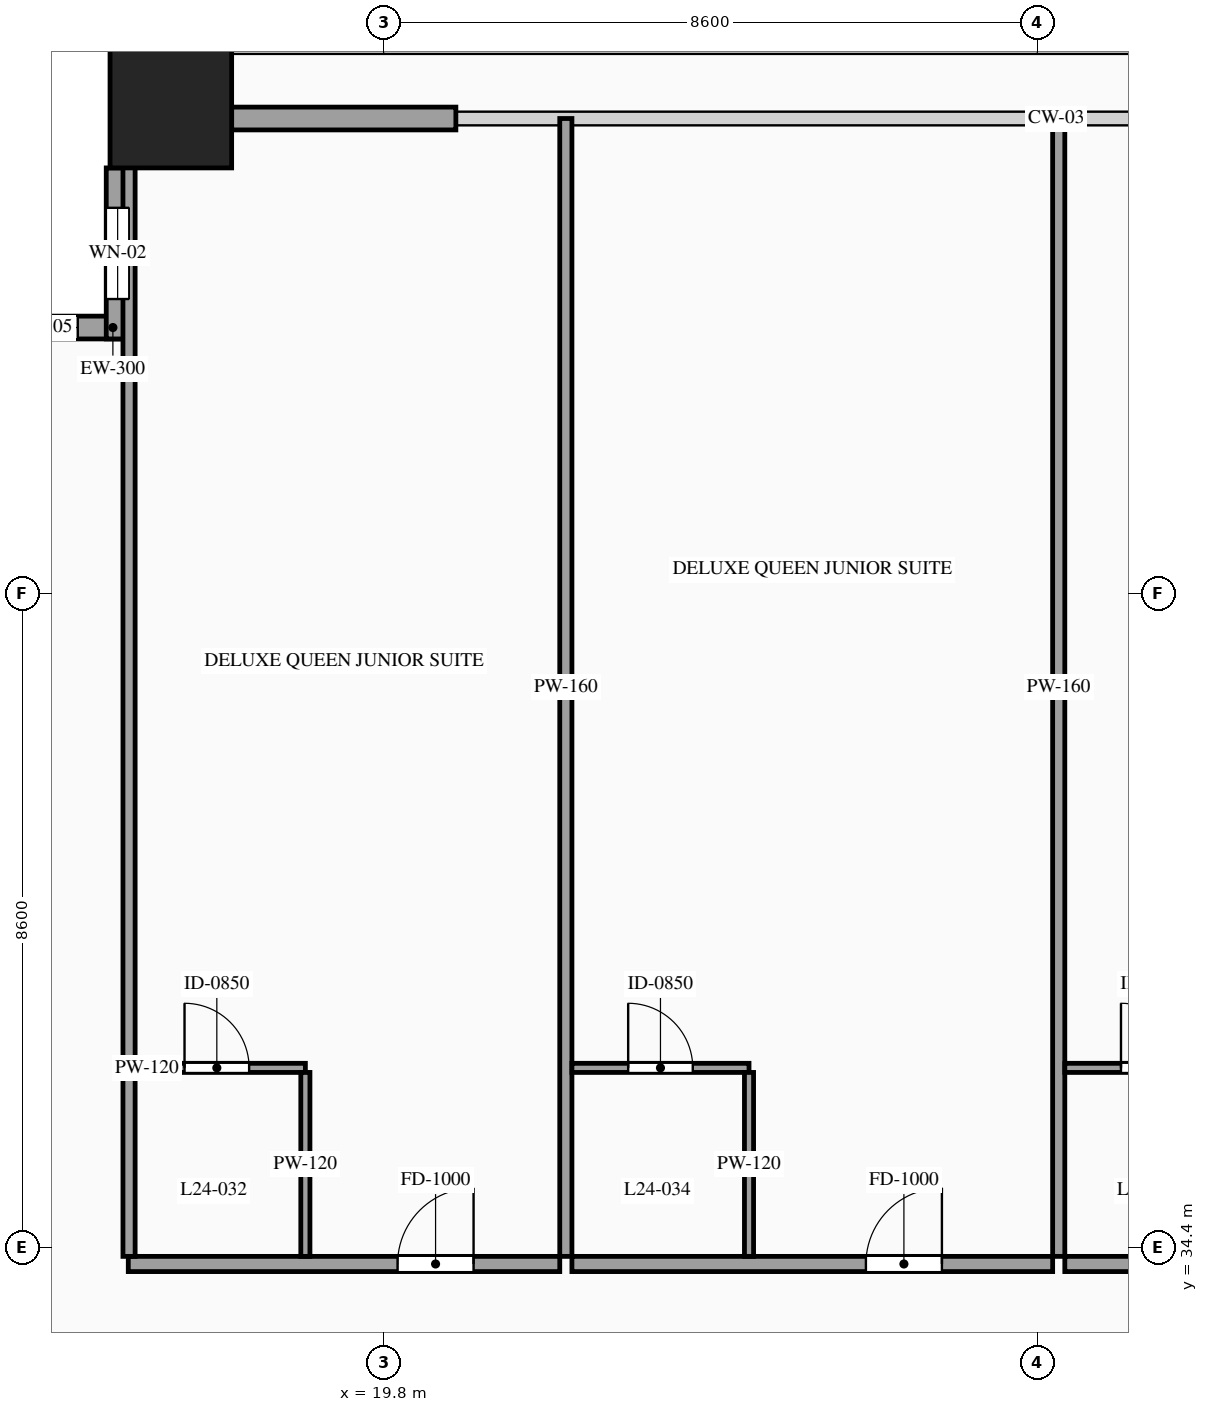
"""IFC4 building model, lengths in metres.
Left out: names, types, materials, properties, quantities, classifications, styles, units other than length and angle.
Written with IfcOpenShell. Run it as: python <this file> out.ifc"""

import sys

from ifc_helpers import new_model, si_unit, direction, frame, frame_2d, origin, origin_2d, place, context, subcontext, project, spatial, rectangle, hollow_rectangle, extrude, source, transform, mapped, element, fill, save


model = new_model("IFC4")
c1 = context("Model", 3, precision=1e-05, world=origin(), true_north=direction((0.0, 1.0)))
c2 = subcontext(c1, "Body", "Model", "MODEL_VIEW")
j1 = project(units=[si_unit("LENGTHUNIT", "METRE"), si_unit("PLANEANGLEUNIT", "RADIAN")], contexts=[c1])
p1 = place(None, origin())
s1 = spatial("IfcSite", under=j1, at=p1, CompositionType="ELEMENT")
p2 = place(p1, origin())
s2 = spatial("IfcBuilding", under=s1, at=p2, CompositionType="ELEMENT")
p3 = place(p2, frame((0.0, 0.0, 93.8)))
s3 = spatial("IfcBuildingStorey", under=s2, at=p3, CompositionType="ELEMENT", Elevation=93.8)
m1 = source(origin(), c2, "Body", "SweptSolid", [
    extrude(hollow_rectangle(XDim=1.6, YDim=1.6, WallThickness=0.07, at=origin_2d()), origin(), (0.0, 0.0, 1.0), 3.6),
])
p4 = place(p3, frame((17.0, 49.4, 0.0), z_axis=(0.0, 0.0, 1.0), x_axis=(1.0, 0.0, 0.0)))
e1 = element("IfcColumn", 1, at=p4, inside=s3, PredefinedType="COLUMN", context=c2, shape_type="MappedRepresentation", body=[
    mapped(m1, transform((0.0, 0.0, 0.0), scale=1.0)),
])
p5 = place(p3, frame((16.45, 46.5, 0.0), z_axis=(0.0, 0.0, 1.0), x_axis=(-1.0, 0.0, 0.0)))
e2 = element("IfcWall", 2, at=p5, inside=s3, PredefinedType="SOLIDWALL", context=c2, shape_type="SweptSolid", body=[
    extrude(rectangle(XDim=2.25, YDim=0.3, at=frame_2d((1.125, 0.0))), origin(), (0.0, 0.0, 1.0), 3.38),
])
p6 = place(p5, frame((0.675, 0.0, 0.85)))
e3 = element("IfcOpeningElement", 3, at=p6, cuts=e2, PredefinedType="OPENING", context=c2, shape_type="SweptSolid", body=[
    extrude(rectangle(XDim=0.9, YDim=1.5, at=frame_2d((0.45, 0.75))), frame((0.0, 0.165, 0.0), z_axis=(0.0, -1.0, 0.0), x_axis=(1.0, 0.0, 0.0)), (0.0, 0.0, 1.0), 0.33),
])
p7 = place(p3, frame((16.3, 48.6, 0.0), z_axis=(0.0, 0.0, 1.0), x_axis=(0.0, -1.0, 0.0)))
e4 = element("IfcWall", 4, at=p7, inside=s3, PredefinedType="SOLIDWALL", context=c2, shape_type="SweptSolid", body=[
    extrude(rectangle(XDim=2.25, YDim=0.3, at=frame_2d((1.125, 0.0))), origin(), (0.0, 0.0, 1.0), 3.38),
])
p8 = place(p7, frame((0.525, 0.0, 0.85)))
e5 = element("IfcOpeningElement", 5, at=p8, cuts=e4, PredefinedType="OPENING", context=c2, shape_type="SweptSolid", body=[
    extrude(rectangle(XDim=1.2, YDim=2.1, at=frame_2d((0.6, 1.05))), frame((0.0, 0.165, 0.0), z_axis=(0.0, -1.0, 0.0), x_axis=(1.0, 0.0, 0.0)), (0.0, 0.0, 1.0), 0.33),
])
m2 = source(origin(), c2, "Body", "SweptSolid", [
    extrude(rectangle(XDim=2.95, YDim=0.3, at=frame_2d((1.475, 0.0))), origin(), (0.0, 0.0, 1.0), 2.775),
])
p9 = place(p3, frame((17.8, 49.25, 0.0), z_axis=(0.0, 0.0, 1.0), x_axis=(1.0, 0.0, 0.0)))
e6 = element("IfcWall", 6, at=p9, inside=s3, PredefinedType="SOLIDWALL", context=c2, shape_type="MappedRepresentation", body=[
    mapped(m2, transform((0.0, 0.0, 0.0), scale=1.0)),
])
p10 = place(p3, frame((16.44, 34.18, 0.0), z_axis=(0.0, 0.0, 1.0), x_axis=(1.0, 0.0, 0.0)))
e7 = element("IfcWall", 7, at=p10, inside=s3, PredefinedType="PARTITIONING", context=c2, shape_type="SweptSolid", body=[
    extrude(rectangle(XDim=5.677, YDim=0.2, at=frame_2d((2.838, 0.0))), origin(), (0.0, 0.0, 1.0), 3.38),
])
p11 = place(p10, frame((3.543, 0.0, 0.0)))
e8 = element("IfcOpeningElement", 8, at=p11, cuts=e7, PredefinedType="OPENING", context=c2, shape_type="SweptSolid", body=[
    extrude(rectangle(XDim=1.0, YDim=2.2, at=frame_2d((0.5, 1.1))), frame((0.0, 0.115, 0.0), z_axis=(0.0, -1.0, 0.0), x_axis=(1.0, 0.0, 0.0)), (0.0, 0.0, 1.0), 0.23),
])
m3 = source(origin(), c2, "Body", "SweptSolid", [
    extrude(rectangle(XDim=14.97, YDim=0.16, at=frame_2d((7.485, 0.0))), origin(), (0.0, 0.0, 1.0), 3.38),
])
p12 = place(p3, frame((22.197, 34.28, 0.0), z_axis=(0.0, 0.0, 1.0), x_axis=(0.0, 1.0, 0.0)))
e9 = element("IfcWall", 9, at=p12, inside=s3, PredefinedType="PARTITIONING", context=c2, shape_type="MappedRepresentation", body=[
    mapped(m3, transform((0.0, 0.0, 0.0), scale=1.0)),
])
p13 = place(p3, frame((16.44, 36.76, 0.0), z_axis=(0.0, 0.0, 1.0), x_axis=(1.0, 0.0, 0.0)))
e10 = element("IfcWall", 10, at=p13, inside=s3, PredefinedType="PARTITIONING", context=c2, shape_type="SweptSolid", body=[
    extrude(rectangle(XDim=2.33, YDim=0.12, at=frame_2d((1.165, 0.0))), origin(), (0.0, 0.0, 1.0), 3.38),
])
p14 = place(p13, frame((0.74, 0.0, 0.0)))
e11 = element("IfcOpeningElement", 11, at=p14, cuts=e10, PredefinedType="OPENING", context=c2, shape_type="SweptSolid", body=[
    extrude(rectangle(XDim=0.85, YDim=2.1, at=frame_2d((0.425, 1.05))), frame((0.0, 0.075, 0.0), z_axis=(0.0, -1.0, 0.0), x_axis=(1.0, 0.0, 0.0)), (0.0, 0.0, 1.0), 0.15),
])
m4 = source(origin(), c2, "Body", "SweptSolid", [
    extrude(rectangle(XDim=2.42, YDim=0.12, at=frame_2d((1.21, 0.0))), origin(), (0.0, 0.0, 1.0), 3.38),
])
p15 = place(p3, frame((18.77, 34.28, 0.0), z_axis=(0.0, 0.0, 1.0), x_axis=(0.0, 1.0, 0.0)))
e12 = element("IfcWall", 12, at=p15, inside=s3, PredefinedType="PARTITIONING", context=c2, shape_type="MappedRepresentation", body=[
    mapped(m4, transform((0.0, 0.0, 0.0), scale=1.0)),
])
p16 = place(p3, frame((22.277, 34.18, 0.0), z_axis=(0.0, 0.0, 1.0), x_axis=(1.0, 0.0, 0.0)))
e13 = element("IfcWall", 13, at=p16, inside=s3, PredefinedType="PARTITIONING", context=c2, shape_type="SweptSolid", body=[
    extrude(rectangle(XDim=6.325, YDim=0.2, at=frame_2d((3.163, 0.0))), origin(), (0.0, 0.0, 1.0), 3.38),
])
p17 = place(p16, frame((3.868, 0.0, 0.0)))
e14 = element("IfcOpeningElement", 14, at=p17, cuts=e13, PredefinedType="OPENING", context=c2, shape_type="SweptSolid", body=[
    extrude(rectangle(XDim=1.0, YDim=2.2, at=frame_2d((0.5, 1.1))), frame((0.0, 0.115, 0.0), z_axis=(0.0, -1.0, 0.0), x_axis=(1.0, 0.0, 0.0)), (0.0, 0.0, 1.0), 0.23),
])
p18 = place(p3, frame((28.682, 34.28, 0.0), z_axis=(0.0, 0.0, 1.0), x_axis=(0.0, 1.0, 0.0)))
e15 = element("IfcWall", 15, at=p18, inside=s3, PredefinedType="PARTITIONING", context=c2, shape_type="MappedRepresentation", body=[
    mapped(m3, transform((0.0, 0.0, 0.0), scale=1.0)),
])
p19 = place(p3, frame((22.277, 36.76, 0.0), z_axis=(0.0, 0.0, 1.0), x_axis=(1.0, 0.0, 0.0)))
e16 = element("IfcWall", 16, at=p19, inside=s3, PredefinedType="PARTITIONING", context=c2, shape_type="SweptSolid", body=[
    extrude(rectangle(XDim=2.33, YDim=0.12, at=frame_2d((1.165, 0.0))), origin(), (0.0, 0.0, 1.0), 3.38),
])
p20 = place(p19, frame((0.74, 0.0, 0.0)))
e17 = element("IfcOpeningElement", 17, at=p20, cuts=e16, PredefinedType="OPENING", context=c2, shape_type="SweptSolid", body=[
    extrude(rectangle(XDim=0.85, YDim=2.1, at=frame_2d((0.425, 1.05))), frame((0.0, 0.075, 0.0), z_axis=(0.0, -1.0, 0.0), x_axis=(1.0, 0.0, 0.0)), (0.0, 0.0, 1.0), 0.15),
])
p21 = place(p3, frame((24.607, 34.28, 0.0), z_axis=(0.0, 0.0, 1.0), x_axis=(0.0, 1.0, 0.0)))
e18 = element("IfcWall", 18, at=p21, inside=s3, PredefinedType="PARTITIONING", context=c2, shape_type="MappedRepresentation", body=[
    mapped(m4, transform((0.0, 0.0, 0.0), scale=1.0)),
])
p22 = place(p3, frame((28.762, 34.18, 0.0), z_axis=(0.0, 0.0, 1.0), x_axis=(1.0, 0.0, 0.0)))
e19 = element("IfcWall", 19, at=p22, inside=s3, PredefinedType="PARTITIONING", context=c2, shape_type="SweptSolid", body=[
    extrude(rectangle(XDim=4.398, YDim=0.2, at=frame_2d((2.199, 0.0))), origin(), (0.0, 0.0, 1.0), 3.38),
])
p23 = place(p22, frame((2.903, 0.0, 0.0)))
e20 = element("IfcOpeningElement", 20, at=p23, cuts=e19, PredefinedType="OPENING", context=c2, shape_type="SweptSolid", body=[
    extrude(rectangle(XDim=1.0, YDim=2.2, at=frame_2d((0.5, 1.1))), frame((0.0, 0.115, 0.0), z_axis=(0.0, -1.0, 0.0), x_axis=(1.0, 0.0, 0.0)), (0.0, 0.0, 1.0), 0.23),
])
p24 = place(p3, frame((28.762, 36.76, 0.0), z_axis=(0.0, 0.0, 1.0), x_axis=(1.0, 0.0, 0.0)))
e21 = element("IfcWall", 21, at=p24, inside=s3, PredefinedType="PARTITIONING", context=c2, shape_type="SweptSolid", body=[
    extrude(rectangle(XDim=2.328, YDim=0.12, at=frame_2d((1.164, 0.0))), origin(), (0.0, 0.0, 1.0), 3.38),
])
p25 = place(p24, frame((0.739, 0.0, 0.0)))
e22 = element("IfcOpeningElement", 22, at=p25, cuts=e21, PredefinedType="OPENING", context=c2, shape_type="SweptSolid", body=[
    extrude(rectangle(XDim=0.85, YDim=2.1, at=frame_2d((0.425, 1.05))), frame((0.0, 0.075, 0.0), z_axis=(0.0, -1.0, 0.0), x_axis=(1.0, 0.0, 0.0)), (0.0, 0.0, 1.0), 0.15),
])
m5 = source(origin(), c2, "Body", "SweptSolid", [
    extrude(rectangle(XDim=14.82, YDim=0.16, at=frame_2d((7.41, 0.0))), origin(), (0.0, 0.0, 1.0), 3.38),
])
p26 = place(p3, frame((16.45, 34.28, 0.0), z_axis=(0.0, 0.0, 1.0), x_axis=(0.0, 1.0, 0.0)))
e23 = element("IfcWall", 23, at=p26, inside=s3, PredefinedType="PARTITIONING", context=c2, shape_type="MappedRepresentation", body=[
    mapped(m5, transform((0.0, 0.0, 0.0), scale=1.0)),
])
m6 = source(origin(), c2, "Body", "SweptSolid", [
    extrude(rectangle(XDim=0.9, YDim=1.5, at=frame_2d((0.45, 0.75))), frame((0.0, 0.03, 0.0), z_axis=(0.0, -1.0, 0.0), x_axis=(1.0, 0.0, 0.0)), (0.0, 0.0, 1.0), 0.06),
])
p27 = place(p6, origin())
e24 = element("IfcWindow", 24, at=p27, inside=s3, PartitioningType="SINGLE_PANEL", PredefinedType="WINDOW", context=c2, shape_type="MappedRepresentation", body=[
    mapped(m6, transform((0.0, 0.0, 0.0), scale=1.0)),
])
fill(e3, e24)
m7 = source(origin(), c2, "Body", "SweptSolid", [
    extrude(rectangle(XDim=1.2, YDim=2.1, at=frame_2d((0.6, 1.05))), frame((0.0, 0.03, 0.0), z_axis=(0.0, -1.0, 0.0), x_axis=(1.0, 0.0, 0.0)), (0.0, 0.0, 1.0), 0.06),
])
p28 = place(p8, origin())
e25 = element("IfcWindow", 25, at=p28, inside=s3, PartitioningType="SINGLE_PANEL", PredefinedType="WINDOW", context=c2, shape_type="MappedRepresentation", body=[
    mapped(m7, transform((0.0, 0.0, 0.0), scale=1.0)),
])
fill(e5, e25)
m8 = source(origin(), c2, "Body", "SweptSolid", [
    extrude(rectangle(XDim=1.0, YDim=2.2, at=frame_2d((0.5, 1.1))), frame((0.0, 0.025, 0.0), z_axis=(0.0, -1.0, 0.0), x_axis=(1.0, 0.0, 0.0)), (0.0, 0.0, 1.0), 0.05),
])
p29 = place(p11, origin())
e26 = element("IfcDoor", 26, at=p29, inside=s3, OperationType="SINGLE_SWING_RIGHT", PredefinedType="DOOR", context=c2, shape_type="MappedRepresentation", body=[
    mapped(m8, transform((0.0, 0.0, 0.0), scale=1.0)),
])
fill(e8, e26)
m9 = source(origin(), c2, "Body", "SweptSolid", [
    extrude(rectangle(XDim=0.85, YDim=2.1, at=frame_2d((0.425, 1.05))), frame((0.0, 0.025, 0.0), z_axis=(0.0, -1.0, 0.0), x_axis=(1.0, 0.0, 0.0)), (0.0, 0.0, 1.0), 0.05),
])
p30 = place(p14, origin())
e27 = element("IfcDoor", 27, at=p30, inside=s3, OperationType="SINGLE_SWING_LEFT", PredefinedType="DOOR", context=c2, shape_type="MappedRepresentation", body=[
    mapped(m9, transform((0.0, 0.0, 0.0), scale=1.0)),
])
fill(e11, e27)
p31 = place(p17, origin())
e28 = element("IfcDoor", 28, at=p31, inside=s3, OperationType="SINGLE_SWING_RIGHT", PredefinedType="DOOR", context=c2, shape_type="MappedRepresentation", body=[
    mapped(m8, transform((0.0, 0.0, 0.0), scale=1.0)),
])
fill(e14, e28)
p32 = place(p20, origin())
e29 = element("IfcDoor", 29, at=p32, inside=s3, OperationType="SINGLE_SWING_LEFT", PredefinedType="DOOR", context=c2, shape_type="MappedRepresentation", body=[
    mapped(m9, transform((0.0, 0.0, 0.0), scale=1.0)),
])
fill(e17, e29)
p33 = place(p25, origin())
e30 = element("IfcDoor", 30, at=p33, inside=s3, OperationType="SINGLE_SWING_LEFT", PredefinedType="DOOR", context=c2, shape_type="MappedRepresentation", body=[
    mapped(m9, transform((0.0, 0.0, 0.0), scale=1.0)),
])
fill(e22, e30)
save(model, sys.argv[1])
